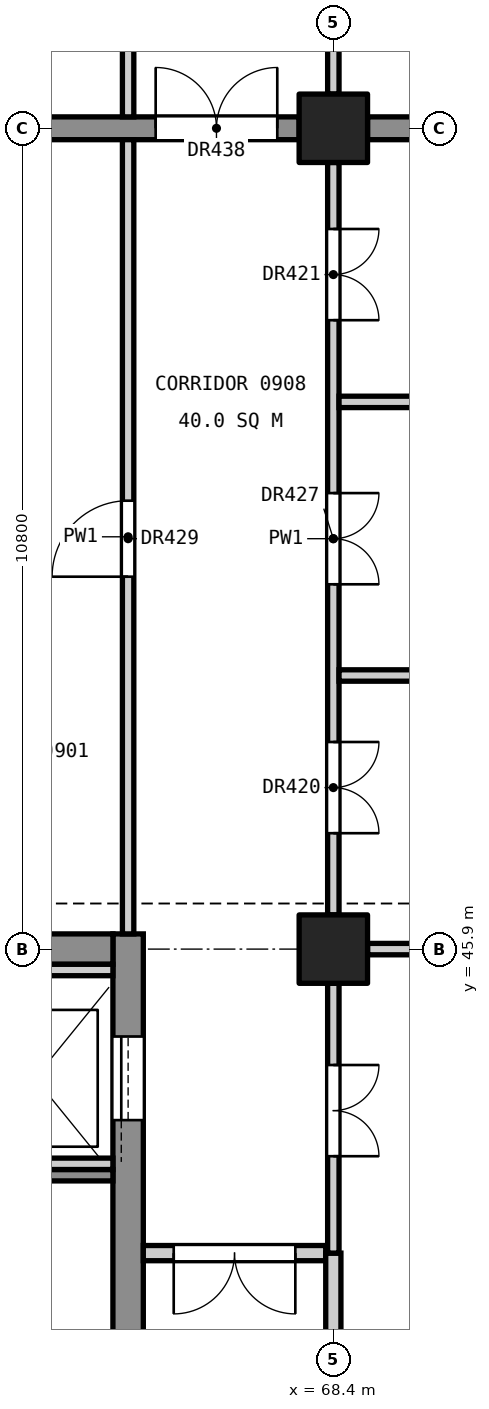
"""IFC4 building model, lengths in metres.
Left out: names, types, materials, properties, quantities, classifications, styles, units other than length and angle.
Written with IfcOpenShell. Run it as: python <this file> out.ifc"""

import sys

from ifc_helpers import new_model, si_unit, direction, frame, frame_2d, origin, origin_2d, place, context, subcontext, project, spatial, rectangle, extrude, element, fill, save


model = new_model("IFC4")
c1 = context("Model", 3, precision=1e-05, world=origin(), true_north=direction((0.0, 1.0)))
c2 = subcontext(c1, "Body", "Model", "MODEL_VIEW")
j1 = project(units=[si_unit("LENGTHUNIT", "METRE"), si_unit("PLANEANGLEUNIT", "RADIAN")], contexts=[c1])
p1 = place(None, origin())
s1 = spatial("IfcSite", under=j1, at=p1, CompositionType="ELEMENT")
p2 = place(p1, origin())
s2 = spatial("IfcBuilding", under=s1, at=p2, CompositionType="ELEMENT")
p3 = place(p2, frame((0.0, 0.0, 46.2)))
s3 = spatial("IfcBuildingStorey", under=s2, at=p3, CompositionType="ELEMENT", Elevation=46.2)
for number, where, z_axis, x_axis in (
    (1, (68.4, 45.9, 0.0), (0.0, 0.0, 1.0), (1.0, 0.0, 0.0)),
    (2, (68.4, 56.7, 0.0), (0.0, 0.0, 1.0), (1.0, 0.0, 0.0)),
):
    element("IfcColumn", number, at=place(p3, frame(where, z_axis=z_axis, x_axis=x_axis)), inside=s3, PredefinedType="COLUMN", context=c2, shape_type="SweptSolid", body=[
        extrude(rectangle(XDim=0.9, YDim=0.9, at=origin_2d()), origin(), (0.0, 0.0, 1.0), 4.8),
    ])
p4 = place(p3, frame((65.7, 34.9, 0.0), z_axis=(0.0, 0.0, 1.0), x_axis=(0.0, 1.0, 0.0)))
e3 = element("IfcWall", 3, at=p4, inside=s3, PredefinedType="SHEAR", context=c2, shape_type="SweptSolid", body=[
    extrude(rectangle(XDim=11.2, YDim=0.4, at=frame_2d((5.6, 0.0))), origin(), (0.0, 0.0, 1.0), 4.55),
])
p5 = place(p4, frame((0.5, 0.0, 0.0)))
e4 = element("IfcOpeningElement", 4, at=p5, cuts=e3, PredefinedType="OPENING", context=c2, shape_type="SweptSolid", body=[
    extrude(rectangle(XDim=1.4, YDim=2.1, at=frame_2d((0.7, 1.05))), frame((0.0, 0.21, 0.0), z_axis=(0.0, -1.0, 0.0), x_axis=(1.0, 0.0, 0.0)), (0.0, 0.0, 1.0), 0.42),
])
p6 = place(p4, frame((8.75, 0.0, 0.0)))
e5 = element("IfcOpeningElement", 5, at=p6, cuts=e3, PredefinedType="OPENING", context=c2, shape_type="SweptSolid", body=[
    extrude(rectangle(XDim=1.1, YDim=2.1, at=frame_2d((0.55, 1.05))), frame((0.0, 0.21, 0.0), z_axis=(0.0, -1.0, 0.0), x_axis=(1.0, 0.0, 0.0)), (0.0, 0.0, 1.0), 0.42),
])
p7 = place(p3, frame((61.4, 45.9, 0.0), z_axis=(0.0, 0.0, 1.0), x_axis=(1.0, 0.0, 0.0)))
e6 = element("IfcWall", 6, at=p7, inside=s3, PredefinedType="SHEAR", context=c2, shape_type="SweptSolid", body=[
    extrude(rectangle(XDim=4.1, YDim=0.4, at=frame_2d((2.05, 0.0))), origin(), (0.0, 0.0, 1.0), 4.55),
])
p8 = place(p3, frame((61.65, 56.7, 0.0), z_axis=(0.0, 0.0, 1.0), x_axis=(1.0, 0.0, 0.0)))
e7 = element("IfcWall", 7, at=p8, inside=s3, PredefinedType="SHEAR", context=c2, shape_type="SweptSolid", body=[
    extrude(rectangle(XDim=6.3, YDim=0.3, at=frame_2d((3.15, 0.0))), origin(), (0.0, 0.0, 1.0), 4.55),
])
p9 = place(p8, frame((4.413, 0.0, 0.0)))
e8 = element("IfcOpeningElement", 8, at=p9, cuts=e7, PredefinedType="OPENING", context=c2, shape_type="SweptSolid", body=[
    extrude(rectangle(XDim=1.6, YDim=2.1, at=frame_2d((0.8, 1.05))), frame((0.0, 0.16, 0.0), z_axis=(0.0, -1.0, 0.0), x_axis=(1.0, 0.0, 0.0)), (0.0, 0.0, 1.0), 0.32),
])
p10 = place(p3, frame((68.85, 56.7, 0.0), z_axis=(0.0, 0.0, 1.0), x_axis=(1.0, 0.0, 0.0)))
e9 = element("IfcWall", 9, at=p10, inside=s3, PredefinedType="SHEAR", context=c2, shape_type="SweptSolid", body=[
    extrude(rectangle(XDim=9.9, YDim=0.3, at=frame_2d((4.95, 0.0))), origin(), (0.0, 0.0, 1.0), 4.55),
])
p11 = place(p3, frame((61.4, 42.925, 0.0), z_axis=(0.0, 0.0, 1.0), x_axis=(1.0, 0.0, 0.0)))
e10 = element("IfcWall", 10, at=p11, inside=s3, PredefinedType="SOLIDWALL", context=c2, shape_type="SweptSolid", body=[
    extrude(rectangle(XDim=4.1, YDim=0.15, at=frame_2d((2.05, 0.0))), origin(), (0.0, 0.0, 1.0), 4.55),
])
for number, where, z_axis, x_axis in (
    (11, (63.65, 43.075, 0.0), (0.0, 0.0, 1.0), (1.0, 0.0, 0.0)),
    (12, (63.65, 45.625, 0.0), (0.0, 0.0, 1.0), (1.0, 0.0, 0.0)),
):
    element("IfcWall", number, at=place(p3, frame(where, z_axis=z_axis, x_axis=x_axis)), inside=s3, PredefinedType="SOLIDWALL", context=c2, shape_type="SweptSolid", body=[
        extrude(rectangle(XDim=1.85, YDim=0.15, at=frame_2d((0.925, 0.0))), origin(), (0.0, 0.0, 1.0), 4.8),
    ])
p12 = place(p3, frame((65.7, 46.1, 0.0), z_axis=(0.0, 0.0, 1.0), x_axis=(0.0, 1.0, 0.0)))
e13 = element("IfcWall", 13, at=p12, inside=s3, PredefinedType="PARTITIONING", context=c2, shape_type="SweptSolid", body=[
    extrude(rectangle(XDim=10.45, YDim=0.15, at=frame_2d((5.225, 0.0))), origin(), (0.0, 0.0, 1.0), 3.55),
])
p13 = place(p12, frame((4.7, 0.0, 0.0)))
e14 = element("IfcOpeningElement", 14, at=p13, cuts=e13, PredefinedType="OPENING", context=c2, shape_type="SweptSolid", body=[
    extrude(rectangle(XDim=1.0, YDim=2.1, at=frame_2d((0.5, 1.05))), frame((0.0, 0.085, 0.0), z_axis=(0.0, -1.0, 0.0), x_axis=(1.0, 0.0, 0.0)), (0.0, 0.0, 1.0), 0.17),
])
p14 = place(p3, frame((65.7, 56.85, 0.0), z_axis=(0.0, 0.0, 1.0), x_axis=(0.0, 1.0, 0.0)))
e15 = element("IfcWall", 15, at=p14, inside=s3, PredefinedType="PARTITIONING", context=c2, shape_type="SweptSolid", body=[
    extrude(rectangle(XDim=3.25, YDim=0.15, at=frame_2d((1.625, 0.0))), origin(), (0.0, 0.0, 1.0), 3.55),
])
p15 = place(p14, frame((1.15, 0.0, 0.0)))
e16 = element("IfcOpeningElement", 16, at=p15, cuts=e15, PredefinedType="OPENING", context=c2, shape_type="SweptSolid", body=[
    extrude(rectangle(XDim=1.0, YDim=2.1, at=frame_2d((0.5, 1.05))), frame((0.0, 0.085, 0.0), z_axis=(0.0, -1.0, 0.0), x_axis=(1.0, 0.0, 0.0)), (0.0, 0.0, 1.0), 0.17),
])
p16 = place(p3, frame((65.9, 41.9, 0.0), z_axis=(0.0, 0.0, 1.0), x_axis=(1.0, 0.0, 0.0)))
e17 = element("IfcWall", 17, at=p16, inside=s3, PredefinedType="PARTITIONING", context=c2, shape_type="SweptSolid", body=[
    extrude(rectangle(XDim=2.4, YDim=0.2, at=frame_2d((1.2, 0.0))), origin(), (0.0, 0.0, 1.0), 3.55),
])
p17 = place(p16, frame((0.4, 0.0, 0.0)))
e18 = element("IfcOpeningElement", 18, at=p17, cuts=e17, PredefinedType="OPENING", context=c2, shape_type="SweptSolid", body=[
    extrude(rectangle(XDim=1.6, YDim=2.1, at=frame_2d((0.8, 1.05))), frame((0.0, 0.11, 0.0), z_axis=(0.0, -1.0, 0.0), x_axis=(1.0, 0.0, 0.0)), (0.0, 0.0, 1.0), 0.22),
])
p18 = place(p3, frame((68.4, 35.55, 0.0), z_axis=(0.0, 0.0, 1.0), x_axis=(0.0, 1.0, 0.0)))
e19 = element("IfcWall", 19, at=p18, inside=s3, PredefinedType="PARTITIONING", context=c2, shape_type="SweptSolid", body=[
    extrude(rectangle(XDim=6.35, YDim=0.2, at=frame_2d((3.175, 0.0))), origin(), (0.0, 0.0, 1.0), 3.55),
])
p19 = place(p3, frame((68.4, 41.9, 0.0), z_axis=(0.0, 0.0, 1.0), x_axis=(0.0, 1.0, 0.0)))
e20 = element("IfcWall", 20, at=p19, inside=s3, PredefinedType="PARTITIONING", context=c2, shape_type="SweptSolid", body=[
    extrude(rectangle(XDim=3.55, YDim=0.15, at=frame_2d((1.775, 0.0))), origin(), (0.0, 0.0, 1.0), 3.55),
])
p20 = place(p19, frame((1.275, 0.0, 0.0)))
e21 = element("IfcOpeningElement", 21, at=p20, cuts=e20, PredefinedType="OPENING", context=c2, shape_type="SweptSolid", body=[
    extrude(rectangle(XDim=1.2, YDim=2.1, at=frame_2d((0.6, 1.05))), frame((0.0, 0.085, 0.0), z_axis=(0.0, -1.0, 0.0), x_axis=(1.0, 0.0, 0.0)), (0.0, 0.0, 1.0), 0.17),
])
p21 = place(p3, frame((68.4, 46.35, 0.0), z_axis=(0.0, 0.0, 1.0), x_axis=(0.0, 1.0, 0.0)))
e22 = element("IfcWall", 22, at=p21, inside=s3, PredefinedType="PARTITIONING", context=c2, shape_type="SweptSolid", body=[
    extrude(rectangle(XDim=9.9, YDim=0.15, at=frame_2d((4.95, 0.0))), origin(), (0.0, 0.0, 1.0), 3.55),
])
p22 = place(p21, frame((1.075, 0.0, 0.0)))
e23 = element("IfcOpeningElement", 23, at=p22, cuts=e22, PredefinedType="OPENING", context=c2, shape_type="SweptSolid", body=[
    extrude(rectangle(XDim=1.2, YDim=2.1, at=frame_2d((0.6, 1.05))), frame((0.0, 0.085, 0.0), z_axis=(0.0, -1.0, 0.0), x_axis=(1.0, 0.0, 0.0)), (0.0, 0.0, 1.0), 0.17),
])
p23 = place(p21, frame((7.825, 0.0, 0.0)))
e24 = element("IfcOpeningElement", 24, at=p23, cuts=e22, PredefinedType="OPENING", context=c2, shape_type="SweptSolid", body=[
    extrude(rectangle(XDim=1.2, YDim=2.1, at=frame_2d((0.6, 1.05))), frame((0.0, 0.085, 0.0), z_axis=(0.0, -1.0, 0.0), x_axis=(1.0, 0.0, 0.0)), (0.0, 0.0, 1.0), 0.17),
])
p24 = place(p21, frame((4.35, 0.0, 0.0)))
e25 = element("IfcOpeningElement", 25, at=p24, cuts=e22, PredefinedType="OPENING", context=c2, shape_type="SweptSolid", body=[
    extrude(rectangle(XDim=1.2, YDim=2.1, at=frame_2d((0.6, 1.05))), frame((0.0, 0.085, 0.0), z_axis=(0.0, -1.0, 0.0), x_axis=(1.0, 0.0, 0.0)), (0.0, 0.0, 1.0), 0.17),
])
p25 = place(p3, frame((68.4, 57.15, 0.0), z_axis=(0.0, 0.0, 1.0), x_axis=(0.0, 1.0, 0.0)))
e26 = element("IfcWall", 26, at=p25, inside=s3, PredefinedType="PARTITIONING", context=c2, shape_type="SweptSolid", body=[
    extrude(rectangle(XDim=3.15, YDim=0.15, at=frame_2d((1.575, 0.0))), origin(), (0.0, 0.0, 1.0), 3.55),
])
p26 = place(p25, frame((1.075, 0.0, 0.0)))
e27 = element("IfcOpeningElement", 27, at=p26, cuts=e26, PredefinedType="OPENING", context=c2, shape_type="SweptSolid", body=[
    extrude(rectangle(XDim=1.2, YDim=2.1, at=frame_2d((0.6, 1.05))), frame((0.0, 0.085, 0.0), z_axis=(0.0, -1.0, 0.0), x_axis=(1.0, 0.0, 0.0)), (0.0, 0.0, 1.0), 0.17),
])
p27 = place(p3, frame((68.85, 45.9, 0.0), z_axis=(0.0, 0.0, 1.0), x_axis=(1.0, 0.0, 0.0)))
e28 = element("IfcWall", 28, at=p27, inside=s3, PredefinedType="PARTITIONING", context=c2, shape_type="SweptSolid", body=[
    extrude(rectangle(XDim=9.9, YDim=0.15, at=frame_2d((4.95, 0.0))), origin(), (0.0, 0.0, 1.0), 3.85),
])
for number, where, z_axis, x_axis in (
    (29, (68.475, 49.5, 0.0), (0.0, 0.0, 1.0), (1.0, 0.0, 0.0)),
    (30, (68.475, 53.1, 0.0), (0.0, 0.0, 1.0), (1.0, 0.0, 0.0)),
):
    element("IfcWall", number, at=place(p3, frame(where, z_axis=z_axis, x_axis=x_axis)), inside=s3, PredefinedType="PARTITIONING", context=c2, shape_type="SweptSolid", body=[
        extrude(rectangle(XDim=10.575, YDim=0.15, at=frame_2d((5.288, 0.0))), origin(), (0.0, 0.0, 1.0), 3.85),
    ])
p28 = place(p6, origin())
e31 = element("IfcDoor", 31, at=p28, inside=s3, OperationType="SLIDING_TO_LEFT", PredefinedType="DOOR", context=c2, shape_type="SweptSolid", body=[
    extrude(rectangle(XDim=1.1, YDim=2.1, at=frame_2d((0.55, 1.05))), frame((0.0, 0.025, 0.0), z_axis=(0.0, -1.0, 0.0), x_axis=(1.0, 0.0, 0.0)), (0.0, 0.0, 1.0), 0.05),
])
fill(e5, e31)
p29 = place(p20, frame((1.2, 0.0, 0.0), z_axis=(0.0, 0.0, 1.0), x_axis=(-1.0, 0.0, 0.0)))
e32 = element("IfcDoor", 32, at=p29, inside=s3, OperationType="DOUBLE_DOOR_SINGLE_SWING", PredefinedType="DOOR", context=c2, shape_type="SweptSolid", body=[
    extrude(rectangle(XDim=1.2, YDim=2.1, at=frame_2d((0.6, 1.05))), frame((0.0, 0.025, 0.0), z_axis=(0.0, -1.0, 0.0), x_axis=(1.0, 0.0, 0.0)), (0.0, 0.0, 1.0), 0.05),
])
fill(e21, e32)
p30 = place(p22, frame((1.2, 0.0, 0.0), z_axis=(0.0, 0.0, 1.0), x_axis=(-1.0, 0.0, 0.0)))
e33 = element("IfcDoor", 33, at=p30, inside=s3, OperationType="DOUBLE_DOOR_SINGLE_SWING", PredefinedType="DOOR", context=c2, shape_type="SweptSolid", body=[
    extrude(rectangle(XDim=1.2, YDim=2.1, at=frame_2d((0.6, 1.05))), frame((0.0, 0.025, 0.0), z_axis=(0.0, -1.0, 0.0), x_axis=(1.0, 0.0, 0.0)), (0.0, 0.0, 1.0), 0.05),
])
fill(e23, e33)
p31 = place(p23, frame((1.2, 0.0, 0.0), z_axis=(0.0, 0.0, 1.0), x_axis=(-1.0, 0.0, 0.0)))
e34 = element("IfcDoor", 34, at=p31, inside=s3, OperationType="DOUBLE_DOOR_SINGLE_SWING", PredefinedType="DOOR", context=c2, shape_type="SweptSolid", body=[
    extrude(rectangle(XDim=1.2, YDim=2.1, at=frame_2d((0.6, 1.05))), frame((0.0, 0.025, 0.0), z_axis=(0.0, -1.0, 0.0), x_axis=(1.0, 0.0, 0.0)), (0.0, 0.0, 1.0), 0.05),
])
fill(e24, e34)
p32 = place(p24, frame((1.2, 0.0, 0.0), z_axis=(0.0, 0.0, 1.0), x_axis=(-1.0, 0.0, 0.0)))
e35 = element("IfcDoor", 35, at=p32, inside=s3, OperationType="DOUBLE_DOOR_SINGLE_SWING", PredefinedType="DOOR", context=c2, shape_type="SweptSolid", body=[
    extrude(rectangle(XDim=1.2, YDim=2.1, at=frame_2d((0.6, 1.05))), frame((0.0, 0.025, 0.0), z_axis=(0.0, -1.0, 0.0), x_axis=(1.0, 0.0, 0.0)), (0.0, 0.0, 1.0), 0.05),
])
fill(e25, e35)
p33 = place(p13, origin())
e36 = element("IfcDoor", 36, at=p33, inside=s3, OperationType="SINGLE_SWING_LEFT", PredefinedType="DOOR", context=c2, shape_type="SweptSolid", body=[
    extrude(rectangle(XDim=1.0, YDim=2.1, at=frame_2d((0.5, 1.05))), frame((0.0, 0.025, 0.0), z_axis=(0.0, -1.0, 0.0), x_axis=(1.0, 0.0, 0.0)), (0.0, 0.0, 1.0), 0.05),
])
fill(e14, e36)
p34 = place(p17, frame((1.6, 0.0, 0.0), z_axis=(0.0, 0.0, 1.0), x_axis=(-1.0, 0.0, 0.0)))
e37 = element("IfcDoor", 37, at=p34, inside=s3, OperationType="DOUBLE_DOOR_SINGLE_SWING", PredefinedType="DOOR", context=c2, shape_type="SweptSolid", body=[
    extrude(rectangle(XDim=1.6, YDim=2.1, at=frame_2d((0.8, 1.05))), frame((0.0, 0.025, 0.0), z_axis=(0.0, -1.0, 0.0), x_axis=(1.0, 0.0, 0.0)), (0.0, 0.0, 1.0), 0.05),
])
fill(e18, e37)
p35 = place(p9, origin())
e38 = element("IfcDoor", 38, at=p35, inside=s3, OperationType="DOUBLE_DOOR_SINGLE_SWING", PredefinedType="DOOR", context=c2, shape_type="SweptSolid", body=[
    extrude(rectangle(XDim=1.6, YDim=2.1, at=frame_2d((0.8, 1.05))), frame((0.0, 0.025, 0.0), z_axis=(0.0, -1.0, 0.0), x_axis=(1.0, 0.0, 0.0)), (0.0, 0.0, 1.0), 0.05),
])
fill(e8, e38)
save(model, sys.argv[1])
